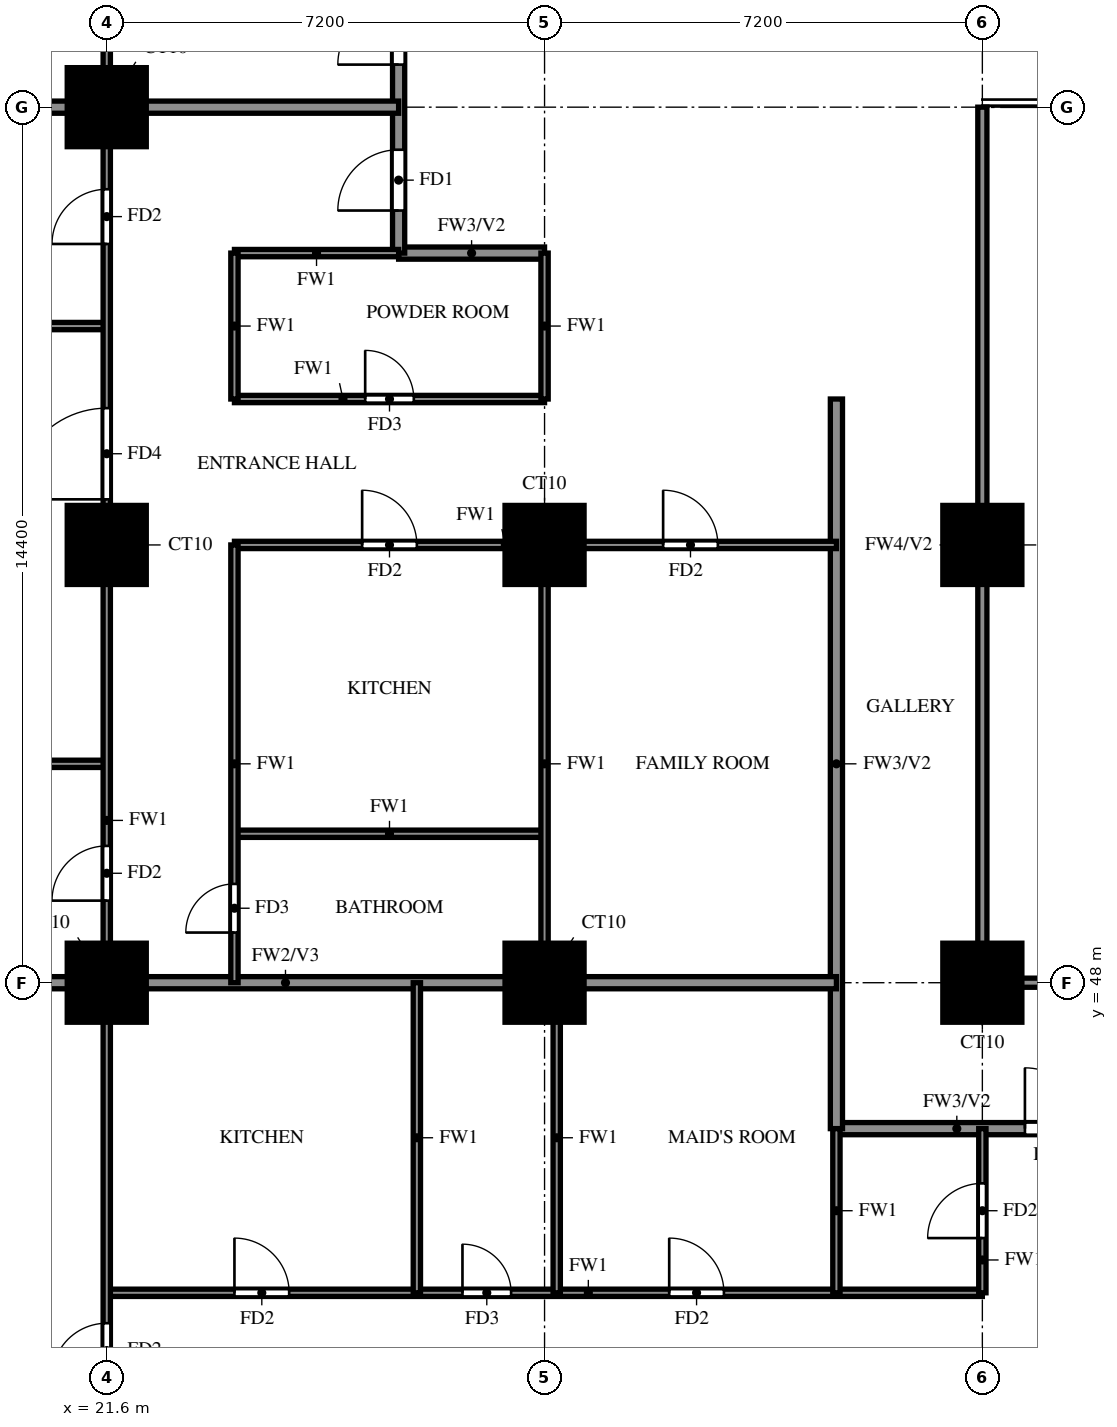
"""IFC4 building model, lengths in metres.
Left out: names, types, materials, properties, quantities, classifications, styles, units other than length and angle.
Written with IfcOpenShell. Run it as: python <this file> out.ifc"""

import sys

from ifc_helpers import new_model, si_unit, direction, frame, frame_2d, origin, origin_2d, place, context, subcontext, project, spatial, rectangle, extrude, source, transform, mapped, element, fill, save


model = new_model("IFC4")
c1 = context("Model", 3, precision=1e-05, world=origin(), true_north=direction((0.0, 1.0)))
c2 = subcontext(c1, "Body", "Model", "MODEL_VIEW")
j1 = project(units=[si_unit("LENGTHUNIT", "METRE"), si_unit("PLANEANGLEUNIT", "RADIAN")], contexts=[c1])
p1 = place(None, origin())
s1 = spatial("IfcSite", under=j1, at=p1, CompositionType="ELEMENT")
p2 = place(p1, origin())
s2 = spatial("IfcBuilding", under=s1, at=p2, CompositionType="ELEMENT")
p3 = place(p2, frame((0.0, 0.0, 90.0)))
s3 = spatial("IfcBuildingStorey", under=s2, at=p3, CompositionType="ELEMENT", Elevation=90.0)
m1 = source(origin(), c2, "Body", "SweptSolid", [
    extrude(rectangle(XDim=1.3, YDim=1.3, at=origin_2d()), origin(), (0.0, 0.0, 1.0), 3.18),
])
for number, where, z_axis, x_axis in (
    (1, (21.6, 48.0, 0.0), (0.0, 0.0, 1.0), (1.0, 0.0, 0.0)),
    (2, (28.8, 48.0, 0.0), (0.0, 0.0, 1.0), (1.0, 0.0, 0.0)),
    (3, (36.0, 48.0, 0.0), (0.0, 0.0, 1.0), (1.0, 0.0, 0.0)),
    (4, (21.6, 55.2, 0.0), (0.0, 0.0, 1.0), (1.0, 0.0, 0.0)),
    (5, (28.8, 55.2, 0.0), (0.0, 0.0, 1.0), (1.0, 0.0, 0.0)),
    (6, (36.0, 55.2, 0.0), (0.0, 0.0, 1.0), (1.0, 0.0, 0.0)),
    (7, (21.6, 62.4, 0.0), (0.0, 0.0, 1.0), (1.0, 0.0, 0.0)),
):
    element("IfcColumn", number, at=place(p3, frame(where, z_axis=z_axis, x_axis=x_axis)), inside=s3, PredefinedType="COLUMN", context=c2, shape_type="MappedRepresentation", body=[
        mapped(m1, transform((0.0, 0.0, 0.0))),
    ])
p4 = place(p3, frame((33.6, 45.6, 0.0), z_axis=(0.0, 0.0, 1.0), x_axis=(1.0, 0.0, 0.0)))
e8 = element("IfcWall", 8, at=p4, inside=s3, PredefinedType="SOLIDWALL", context=c2, shape_type="SweptSolid", body=[
    extrude(rectangle(XDim=7.2, YDim=0.2, at=frame_2d((3.6, 0.0))), origin(), (0.0, 0.0, 1.0), 3.18),
])
p5 = place(p4, frame((3.1, 0.0, 0.0)))
e9 = element("IfcOpeningElement", 9, at=p5, cuts=e8, PredefinedType="OPENING", context=c2, shape_type="SweptSolid", body=[
    extrude(rectangle(XDim=1.0, YDim=2.1, at=frame_2d((0.5, 1.05))), frame((0.0, 0.11, 0.0), z_axis=(0.0, -1.0, 0.0), x_axis=(1.0, 0.0, 0.0)), (0.0, 0.0, 1.0), 0.22),
])
p6 = place(p3, frame((26.4, 60.0, 0.0), z_axis=(0.0, 0.0, 1.0), x_axis=(1.0, 0.0, 0.0)))
e10 = element("IfcWall", 10, at=p6, inside=s3, PredefinedType="SOLIDWALL", context=c2, shape_type="SweptSolid", body=[
    extrude(rectangle(XDim=2.4, YDim=0.2, at=frame_2d((1.2, 0.0))), origin(), (0.0, 0.0, 1.0), 3.18),
])
p7 = place(p3, frame((26.4, 60.0, 0.0), z_axis=(0.0, 0.0, 1.0), x_axis=(0.0, 1.0, 0.0)))
e11 = element("IfcWall", 11, at=p7, inside=s3, PredefinedType="SOLIDWALL", context=c2, shape_type="SweptSolid", body=[
    extrude(rectangle(XDim=9.45, YDim=0.2, at=frame_2d((4.725, 0.0))), origin(), (0.0, 0.0, 1.0), 3.18),
])
p8 = place(p7, frame((0.7, 0.0, 0.0)))
e12 = element("IfcOpeningElement", 12, at=p8, cuts=e11, PredefinedType="OPENING", context=c2, shape_type="SweptSolid", body=[
    extrude(rectangle(XDim=1.0, YDim=2.1, at=frame_2d((0.5, 1.05))), frame((0.0, 0.11, 0.0), z_axis=(0.0, -1.0, 0.0), x_axis=(1.0, 0.0, 0.0)), (0.0, 0.0, 1.0), 0.22),
])
p9 = place(p7, frame((3.1, 0.0, 0.0)))
e13 = element("IfcOpeningElement", 13, at=p9, cuts=e11, PredefinedType="OPENING", context=c2, shape_type="SweptSolid", body=[
    extrude(rectangle(XDim=1.0, YDim=2.1, at=frame_2d((0.5, 1.05))), frame((0.0, 0.11, 0.0), z_axis=(0.0, -1.0, 0.0), x_axis=(1.0, 0.0, 0.0)), (0.0, 0.0, 1.0), 0.22),
])
p10 = place(p3, frame((33.6, 45.6, 0.0), z_axis=(0.0, 0.0, 1.0), x_axis=(0.0, 1.0, 0.0)))
e14 = element("IfcWall", 14, at=p10, inside=s3, PredefinedType="SOLIDWALL", context=c2, shape_type="SweptSolid", body=[
    extrude(rectangle(XDim=12.0, YDim=0.2, at=frame_2d((6.0, 0.0))), origin(), (0.0, 0.0, 1.0), 3.18),
])
p11 = place(p3, frame((14.525, 48.0, 0.0), z_axis=(0.0, 0.0, 1.0), x_axis=(1.0, 0.0, 0.0)))
e15 = element("IfcWall", 15, at=p11, inside=s3, PredefinedType="SOLIDWALL", context=c2, shape_type="SweptSolid", body=[
    extrude(rectangle(XDim=19.075, YDim=0.2, at=frame_2d((9.538, 0.0))), origin(), (0.0, 0.0, 1.0), 3.18),
])
p12 = place(p3, frame((14.525, 62.4, 0.0), z_axis=(0.0, 0.0, 1.0), x_axis=(1.0, 0.0, 0.0)))
e16 = element("IfcWall", 16, at=p12, inside=s3, PredefinedType="SOLIDWALL", context=c2, shape_type="SweptSolid", body=[
    extrude(rectangle(XDim=11.875, YDim=0.2, at=frame_2d((5.938, 0.0))), origin(), (0.0, 0.0, 1.0), 3.18),
])
p13 = place(p3, frame((21.6, 42.9, 0.0), z_axis=(0.0, 0.0, 1.0), x_axis=(1.0, 0.0, 0.0)))
e17 = element("IfcWall", 17, at=p13, inside=s3, PredefinedType="PARTITIONING", context=c2, shape_type="SweptSolid", body=[
    extrude(rectangle(XDim=14.4, YDim=0.12, at=frame_2d((7.2, 0.0))), origin(), (0.0, 0.0, 1.0), 3.18),
])
p14 = place(p13, frame((2.1, 0.0, 0.0)))
e18 = element("IfcOpeningElement", 18, at=p14, cuts=e17, PredefinedType="OPENING", context=c2, shape_type="SweptSolid", body=[
    extrude(rectangle(XDim=0.9, YDim=2.1, at=frame_2d((0.45, 1.05))), frame((0.0, 0.07, 0.0), z_axis=(0.0, -1.0, 0.0), x_axis=(1.0, 0.0, 0.0)), (0.0, 0.0, 1.0), 0.14),
])
p15 = place(p13, frame((5.85, 0.0, 0.0)))
e19 = element("IfcOpeningElement", 19, at=p15, cuts=e17, PredefinedType="OPENING", context=c2, shape_type="SweptSolid", body=[
    extrude(rectangle(XDim=0.8, YDim=2.1, at=frame_2d((0.4, 1.05))), frame((0.0, 0.07, 0.0), z_axis=(0.0, -1.0, 0.0), x_axis=(1.0, 0.0, 0.0)), (0.0, 0.0, 1.0), 0.14),
])
p16 = place(p13, frame((9.25, 0.0, 0.0)))
e20 = element("IfcOpeningElement", 20, at=p16, cuts=e17, PredefinedType="OPENING", context=c2, shape_type="SweptSolid", body=[
    extrude(rectangle(XDim=0.9, YDim=2.1, at=frame_2d((0.45, 1.05))), frame((0.0, 0.07, 0.0), z_axis=(0.0, -1.0, 0.0), x_axis=(1.0, 0.0, 0.0)), (0.0, 0.0, 1.0), 0.14),
])
p17 = place(p3, frame((23.7, 50.45, 0.0), z_axis=(0.0, 0.0, 1.0), x_axis=(1.0, 0.0, 0.0)))
e21 = element("IfcWall", 21, at=p17, inside=s3, PredefinedType="PARTITIONING", context=c2, shape_type="SweptSolid", body=[
    extrude(rectangle(XDim=5.1, YDim=0.12, at=frame_2d((2.55, 0.0))), origin(), (0.0, 0.0, 1.0), 3.18),
])
p18 = place(p3, frame((14.525, 51.6, 0.0), z_axis=(0.0, 0.0, 1.0), x_axis=(1.0, 0.0, 0.0)))
e22 = element("IfcWall", 22, at=p18, inside=s3, PredefinedType="PARTITIONING", context=c2, shape_type="SweptSolid", body=[
    extrude(rectangle(XDim=7.075, YDim=0.12, at=frame_2d((3.538, 0.0))), origin(), (0.0, 0.0, 1.0), 2.28),
])
p19 = place(p3, frame((23.7, 55.2, 0.0), z_axis=(0.0, 0.0, 1.0), x_axis=(1.0, 0.0, 0.0)))
e23 = element("IfcWall", 23, at=p19, inside=s3, PredefinedType="PARTITIONING", context=c2, shape_type="SweptSolid", body=[
    extrude(rectangle(XDim=9.9, YDim=0.12, at=frame_2d((4.95, 0.0))), origin(), (0.0, 0.0, 1.0), 3.18),
])
p20 = place(p19, frame((2.1, 0.0, 0.0)))
e24 = element("IfcOpeningElement", 24, at=p20, cuts=e23, PredefinedType="OPENING", context=c2, shape_type="SweptSolid", body=[
    extrude(rectangle(XDim=0.9, YDim=2.1, at=frame_2d((0.45, 1.05))), frame((0.0, 0.07, 0.0), z_axis=(0.0, -1.0, 0.0), x_axis=(1.0, 0.0, 0.0)), (0.0, 0.0, 1.0), 0.14),
])
p21 = place(p19, frame((7.05, 0.0, 0.0)))
e25 = element("IfcOpeningElement", 25, at=p21, cuts=e23, PredefinedType="OPENING", context=c2, shape_type="SweptSolid", body=[
    extrude(rectangle(XDim=0.9, YDim=2.1, at=frame_2d((0.45, 1.05))), frame((0.0, 0.07, 0.0), z_axis=(0.0, -1.0, 0.0), x_axis=(1.0, 0.0, 0.0)), (0.0, 0.0, 1.0), 0.14),
])
p22 = place(p3, frame((23.7, 57.6, 0.0), z_axis=(0.0, 0.0, 1.0), x_axis=(1.0, 0.0, 0.0)))
e26 = element("IfcWall", 26, at=p22, inside=s3, PredefinedType="PARTITIONING", context=c2, shape_type="SweptSolid", body=[
    extrude(rectangle(XDim=5.1, YDim=0.12, at=frame_2d((2.55, 0.0))), origin(), (0.0, 0.0, 1.0), 3.18),
])
p23 = place(p22, frame((2.15, 0.0, 0.0)))
e27 = element("IfcOpeningElement", 27, at=p23, cuts=e26, PredefinedType="OPENING", context=c2, shape_type="SweptSolid", body=[
    extrude(rectangle(XDim=0.8, YDim=2.1, at=frame_2d((0.4, 1.05))), frame((0.0, 0.07, 0.0), z_axis=(0.0, -1.0, 0.0), x_axis=(1.0, 0.0, 0.0)), (0.0, 0.0, 1.0), 0.14),
])
p24 = place(p3, frame((14.525, 58.8, 0.0), z_axis=(0.0, 0.0, 1.0), x_axis=(1.0, 0.0, 0.0)))
e28 = element("IfcWall", 28, at=p24, inside=s3, PredefinedType="PARTITIONING", context=c2, shape_type="SweptSolid", body=[
    extrude(rectangle(XDim=7.075, YDim=0.12, at=frame_2d((3.538, 0.0))), origin(), (0.0, 0.0, 1.0), 2.28),
])
p25 = place(p3, frame((23.7, 60.0, 0.0), z_axis=(0.0, 0.0, 1.0), x_axis=(1.0, 0.0, 0.0)))
e29 = element("IfcWall", 29, at=p25, inside=s3, PredefinedType="PARTITIONING", context=c2, shape_type="SweptSolid", body=[
    extrude(rectangle(XDim=2.7, YDim=0.12, at=frame_2d((1.35, 0.0))), origin(), (0.0, 0.0, 1.0), 3.18),
])
p26 = place(p3, frame((21.6, 33.725, 0.0), z_axis=(0.0, 0.0, 1.0), x_axis=(0.0, 1.0, 0.0)))
e30 = element("IfcWall", 30, at=p26, inside=s3, PredefinedType="PARTITIONING", context=c2, shape_type="SweptSolid", body=[
    extrude(rectangle(XDim=32.275, YDim=0.12, at=frame_2d((16.137, 0.0))), origin(), (0.0, 0.0, 1.0), 3.18),
])
p27 = place(p26, frame((7.775, 0.0, 0.0)))
e31 = element("IfcOpeningElement", 31, at=p27, cuts=e30, PredefinedType="OPENING", context=c2, shape_type="SweptSolid", body=[
    extrude(rectangle(XDim=0.9, YDim=2.1, at=frame_2d((0.45, 1.05))), frame((0.0, 0.07, 0.0), z_axis=(0.0, -1.0, 0.0), x_axis=(1.0, 0.0, 0.0)), (0.0, 0.0, 1.0), 0.14),
])
p28 = place(p26, frame((15.625, 0.0, 0.0)))
e32 = element("IfcOpeningElement", 32, at=p28, cuts=e30, PredefinedType="OPENING", context=c2, shape_type="SweptSolid", body=[
    extrude(rectangle(XDim=0.9, YDim=2.1, at=frame_2d((0.45, 1.05))), frame((0.0, 0.07, 0.0), z_axis=(0.0, -1.0, 0.0), x_axis=(1.0, 0.0, 0.0)), (0.0, 0.0, 1.0), 0.14),
])
p29 = place(p26, frame((22.225, 0.0, 0.0)))
e33 = element("IfcOpeningElement", 33, at=p29, cuts=e30, PredefinedType="OPENING", context=c2, shape_type="SweptSolid", body=[
    extrude(rectangle(XDim=1.5, YDim=2.1, at=frame_2d((0.75, 1.05))), frame((0.0, 0.07, 0.0), z_axis=(0.0, -1.0, 0.0), x_axis=(1.0, 0.0, 0.0)), (0.0, 0.0, 1.0), 0.14),
])
p30 = place(p26, frame((26.425, 0.0, 0.0)))
e34 = element("IfcOpeningElement", 34, at=p30, cuts=e30, PredefinedType="OPENING", context=c2, shape_type="SweptSolid", body=[
    extrude(rectangle(XDim=0.9, YDim=2.1, at=frame_2d((0.45, 1.05))), frame((0.0, 0.07, 0.0), z_axis=(0.0, -1.0, 0.0), x_axis=(1.0, 0.0, 0.0)), (0.0, 0.0, 1.0), 0.14),
])
p31 = place(p26, frame((30.025, 0.0, 0.0)))
e35 = element("IfcOpeningElement", 35, at=p31, cuts=e30, PredefinedType="OPENING", context=c2, shape_type="SweptSolid", body=[
    extrude(rectangle(XDim=0.9, YDim=2.1, at=frame_2d((0.45, 1.05))), frame((0.0, 0.07, 0.0), z_axis=(0.0, -1.0, 0.0), x_axis=(1.0, 0.0, 0.0)), (0.0, 0.0, 1.0), 0.14),
])
p32 = place(p3, frame((23.7, 48.0, 0.0), z_axis=(0.0, 0.0, 1.0), x_axis=(0.0, 1.0, 0.0)))
e36 = element("IfcWall", 36, at=p32, inside=s3, PredefinedType="PARTITIONING", context=c2, shape_type="SweptSolid", body=[
    extrude(rectangle(XDim=7.2, YDim=0.12, at=frame_2d((3.6, 0.0))), origin(), (0.0, 0.0, 1.0), 3.18),
])
p33 = place(p32, frame((0.825, 0.0, 0.0)))
e37 = element("IfcOpeningElement", 37, at=p33, cuts=e36, PredefinedType="OPENING", context=c2, shape_type="SweptSolid", body=[
    extrude(rectangle(XDim=0.8, YDim=2.1, at=frame_2d((0.4, 1.05))), frame((0.0, 0.07, 0.0), z_axis=(0.0, -1.0, 0.0), x_axis=(1.0, 0.0, 0.0)), (0.0, 0.0, 1.0), 0.14),
])
p34 = place(p3, frame((23.7, 57.6, 0.0), z_axis=(0.0, 0.0, 1.0), x_axis=(0.0, 1.0, 0.0)))
e38 = element("IfcWall", 38, at=p34, inside=s3, PredefinedType="PARTITIONING", context=c2, shape_type="SweptSolid", body=[
    extrude(rectangle(XDim=2.4, YDim=0.12, at=frame_2d((1.2, 0.0))), origin(), (0.0, 0.0, 1.0), 3.18),
])
p35 = place(p3, frame((26.7, 42.9, 0.0), z_axis=(0.0, 0.0, 1.0), x_axis=(0.0, 1.0, 0.0)))
e39 = element("IfcWall", 39, at=p35, inside=s3, PredefinedType="PARTITIONING", context=c2, shape_type="SweptSolid", body=[
    extrude(rectangle(XDim=5.1, YDim=0.12, at=frame_2d((2.55, 0.0))), origin(), (0.0, 0.0, 1.0), 3.18),
])
p36 = place(p3, frame((28.8, 48.0, 0.0), z_axis=(0.0, 0.0, 1.0), x_axis=(0.0, 1.0, 0.0)))
e40 = element("IfcWall", 40, at=p36, inside=s3, PredefinedType="PARTITIONING", context=c2, shape_type="SweptSolid", body=[
    extrude(rectangle(XDim=7.2, YDim=0.12, at=frame_2d((3.6, 0.0))), origin(), (0.0, 0.0, 1.0), 3.18),
])
p37 = place(p3, frame((28.8, 57.6, 0.0), z_axis=(0.0, 0.0, 1.0), x_axis=(0.0, 1.0, 0.0)))
e41 = element("IfcWall", 41, at=p37, inside=s3, PredefinedType="PARTITIONING", context=c2, shape_type="SweptSolid", body=[
    extrude(rectangle(XDim=2.4, YDim=0.12, at=frame_2d((1.2, 0.0))), origin(), (0.0, 0.0, 1.0), 3.18),
])
p38 = place(p3, frame((29.0, 42.9, 0.0), z_axis=(0.0, 0.0, 1.0), x_axis=(0.0, 1.0, 0.0)))
e42 = element("IfcWall", 42, at=p38, inside=s3, PredefinedType="PARTITIONING", context=c2, shape_type="SweptSolid", body=[
    extrude(rectangle(XDim=5.1, YDim=0.12, at=frame_2d((2.55, 0.0))), origin(), (0.0, 0.0, 1.0), 3.18),
])
p39 = place(p3, frame((33.6, 42.9, 0.0), z_axis=(0.0, 0.0, 1.0), x_axis=(0.0, 1.0, 0.0)))
e43 = element("IfcWall", 43, at=p39, inside=s3, PredefinedType="PARTITIONING", context=c2, shape_type="SweptSolid", body=[
    extrude(rectangle(XDim=2.7, YDim=0.12, at=frame_2d((1.35, 0.0))), origin(), (0.0, 0.0, 1.0), 3.18),
])
p40 = place(p3, frame((36.0, 42.9, 0.0), z_axis=(0.0, 0.0, 1.0), x_axis=(0.0, 1.0, 0.0)))
e44 = element("IfcWall", 44, at=p40, inside=s3, PredefinedType="PARTITIONING", context=c2, shape_type="SweptSolid", body=[
    extrude(rectangle(XDim=2.7, YDim=0.12, at=frame_2d((1.35, 0.0))), origin(), (0.0, 0.0, 1.0), 3.18),
])
p41 = place(p40, frame((0.9, 0.0, 0.0)))
e45 = element("IfcOpeningElement", 45, at=p41, cuts=e44, PredefinedType="OPENING", context=c2, shape_type="SweptSolid", body=[
    extrude(rectangle(XDim=0.9, YDim=2.1, at=frame_2d((0.45, 1.05))), frame((0.0, 0.07, 0.0), z_axis=(0.0, -1.0, 0.0), x_axis=(1.0, 0.0, 0.0)), (0.0, 0.0, 1.0), 0.14),
])
p42 = place(p3, frame((36.0, 48.0, 0.0), z_axis=(0.0, 0.0, 1.0), x_axis=(1.0, 0.0, 0.0)))
e46 = element("IfcWall", 46, at=p42, inside=s3, PredefinedType="SOLIDWALL", context=c2, shape_type="SweptSolid", body=[
    extrude(rectangle(XDim=7.2, YDim=0.15, at=frame_2d((3.6, 0.0))), origin(), (0.0, 0.0, 1.0), 2.28),
])
p43 = place(p3, frame((36.0, 48.0, 0.0), z_axis=(0.0, 0.0, 1.0), x_axis=(0.0, 1.0, 0.0)))
e47 = element("IfcWall", 47, at=p43, inside=s3, PredefinedType="SOLIDWALL", context=c2, shape_type="SweptSolid", body=[
    extrude(rectangle(XDim=14.4, YDim=0.15, at=frame_2d((7.2, 0.0))), origin(), (0.0, 0.0, 1.0), 2.28),
])
p44 = place(p5, origin())
e48 = element("IfcDoor", 48, at=p44, inside=s3, OperationType="SINGLE_SWING_LEFT", PredefinedType="DOOR", context=c2, shape_type="SweptSolid", body=[
    extrude(rectangle(XDim=1.0, YDim=2.1, at=frame_2d((0.5, 1.05))), frame((0.0, 0.025, 0.0), z_axis=(0.0, -1.0, 0.0), x_axis=(1.0, 0.0, 0.0)), (0.0, 0.0, 1.0), 0.05),
])
fill(e9, e48)
p45 = place(p27, origin())
e49 = element("IfcDoor", 49, at=p45, inside=s3, OperationType="SINGLE_SWING_LEFT", PredefinedType="DOOR", context=c2, shape_type="SweptSolid", body=[
    extrude(rectangle(XDim=0.9, YDim=2.1, at=frame_2d((0.45, 1.05))), frame((0.0, 0.025, 0.0), z_axis=(0.0, -1.0, 0.0), x_axis=(1.0, 0.0, 0.0)), (0.0, 0.0, 1.0), 0.05),
])
fill(e31, e49)
p46 = place(p14, origin())
e50 = element("IfcDoor", 50, at=p46, inside=s3, OperationType="SINGLE_SWING_RIGHT", PredefinedType="DOOR", context=c2, shape_type="SweptSolid", body=[
    extrude(rectangle(XDim=0.9, YDim=2.1, at=frame_2d((0.45, 1.05))), frame((0.0, 0.025, 0.0), z_axis=(0.0, -1.0, 0.0), x_axis=(1.0, 0.0, 0.0)), (0.0, 0.0, 1.0), 0.05),
])
fill(e18, e50)
p47 = place(p15, origin())
e51 = element("IfcDoor", 51, at=p47, inside=s3, OperationType="SINGLE_SWING_LEFT", PredefinedType="DOOR", context=c2, shape_type="SweptSolid", body=[
    extrude(rectangle(XDim=0.8, YDim=2.1, at=frame_2d((0.4, 1.05))), frame((0.0, 0.025, 0.0), z_axis=(0.0, -1.0, 0.0), x_axis=(1.0, 0.0, 0.0)), (0.0, 0.0, 1.0), 0.05),
])
fill(e19, e51)
p48 = place(p16, origin())
e52 = element("IfcDoor", 52, at=p48, inside=s3, OperationType="SINGLE_SWING_LEFT", PredefinedType="DOOR", context=c2, shape_type="SweptSolid", body=[
    extrude(rectangle(XDim=0.9, YDim=2.1, at=frame_2d((0.45, 1.05))), frame((0.0, 0.025, 0.0), z_axis=(0.0, -1.0, 0.0), x_axis=(1.0, 0.0, 0.0)), (0.0, 0.0, 1.0), 0.05),
])
fill(e20, e52)
p49 = place(p41, origin())
e53 = element("IfcDoor", 53, at=p49, inside=s3, OperationType="SINGLE_SWING_RIGHT", PredefinedType="DOOR", context=c2, shape_type="SweptSolid", body=[
    extrude(rectangle(XDim=0.9, YDim=2.1, at=frame_2d((0.45, 1.05))), frame((0.0, 0.025, 0.0), z_axis=(0.0, -1.0, 0.0), x_axis=(1.0, 0.0, 0.0)), (0.0, 0.0, 1.0), 0.05),
])
fill(e45, e53)
p50 = place(p8, origin())
e54 = element("IfcDoor", 54, at=p50, inside=s3, OperationType="SINGLE_SWING_LEFT", PredefinedType="DOOR", context=c2, shape_type="SweptSolid", body=[
    extrude(rectangle(XDim=1.0, YDim=2.1, at=frame_2d((0.5, 1.05))), frame((0.0, 0.025, 0.0), z_axis=(0.0, -1.0, 0.0), x_axis=(1.0, 0.0, 0.0)), (0.0, 0.0, 1.0), 0.05),
])
fill(e12, e54)
p51 = place(p28, origin())
e55 = element("IfcDoor", 55, at=p51, inside=s3, OperationType="SINGLE_SWING_RIGHT", PredefinedType="DOOR", context=c2, shape_type="SweptSolid", body=[
    extrude(rectangle(XDim=0.9, YDim=2.1, at=frame_2d((0.45, 1.05))), frame((0.0, 0.025, 0.0), z_axis=(0.0, -1.0, 0.0), x_axis=(1.0, 0.0, 0.0)), (0.0, 0.0, 1.0), 0.05),
])
fill(e32, e55)
p52 = place(p29, origin())
e56 = element("IfcDoor", 56, at=p52, inside=s3, OperationType="SINGLE_SWING_RIGHT", PredefinedType="DOOR", context=c2, shape_type="SweptSolid", body=[
    extrude(rectangle(XDim=1.5, YDim=2.1, at=frame_2d((0.75, 1.05))), frame((0.0, 0.025, 0.0), z_axis=(0.0, -1.0, 0.0), x_axis=(1.0, 0.0, 0.0)), (0.0, 0.0, 1.0), 0.05),
])
fill(e33, e56)
p53 = place(p30, origin())
e57 = element("IfcDoor", 57, at=p53, inside=s3, OperationType="SINGLE_SWING_LEFT", PredefinedType="DOOR", context=c2, shape_type="SweptSolid", body=[
    extrude(rectangle(XDim=0.9, YDim=2.1, at=frame_2d((0.45, 1.05))), frame((0.0, 0.025, 0.0), z_axis=(0.0, -1.0, 0.0), x_axis=(1.0, 0.0, 0.0)), (0.0, 0.0, 1.0), 0.05),
])
fill(e34, e57)
p54 = place(p33, origin())
e58 = element("IfcDoor", 58, at=p54, inside=s3, OperationType="SINGLE_SWING_RIGHT", PredefinedType="DOOR", context=c2, shape_type="SweptSolid", body=[
    extrude(rectangle(XDim=0.8, YDim=2.1, at=frame_2d((0.4, 1.05))), frame((0.0, 0.025, 0.0), z_axis=(0.0, -1.0, 0.0), x_axis=(1.0, 0.0, 0.0)), (0.0, 0.0, 1.0), 0.05),
])
fill(e37, e58)
p55 = place(p20, origin())
e59 = element("IfcDoor", 59, at=p55, inside=s3, OperationType="SINGLE_SWING_LEFT", PredefinedType="DOOR", context=c2, shape_type="SweptSolid", body=[
    extrude(rectangle(XDim=0.9, YDim=2.1, at=frame_2d((0.45, 1.05))), frame((0.0, 0.025, 0.0), z_axis=(0.0, -1.0, 0.0), x_axis=(1.0, 0.0, 0.0)), (0.0, 0.0, 1.0), 0.05),
])
fill(e24, e59)
p56 = place(p23, origin())
e60 = element("IfcDoor", 60, at=p56, inside=s3, OperationType="SINGLE_SWING_LEFT", PredefinedType="DOOR", context=c2, shape_type="SweptSolid", body=[
    extrude(rectangle(XDim=0.8, YDim=2.1, at=frame_2d((0.4, 1.05))), frame((0.0, 0.025, 0.0), z_axis=(0.0, -1.0, 0.0), x_axis=(1.0, 0.0, 0.0)), (0.0, 0.0, 1.0), 0.05),
])
fill(e27, e60)
p57 = place(p21, origin())
e61 = element("IfcDoor", 61, at=p57, inside=s3, OperationType="SINGLE_SWING_RIGHT", PredefinedType="DOOR", context=c2, shape_type="SweptSolid", body=[
    extrude(rectangle(XDim=0.9, YDim=2.1, at=frame_2d((0.45, 1.05))), frame((0.0, 0.025, 0.0), z_axis=(0.0, -1.0, 0.0), x_axis=(1.0, 0.0, 0.0)), (0.0, 0.0, 1.0), 0.05),
])
fill(e25, e61)
p58 = place(p9, origin())
e62 = element("IfcDoor", 62, at=p58, inside=s3, OperationType="SINGLE_SWING_LEFT", PredefinedType="DOOR", context=c2, shape_type="SweptSolid", body=[
    extrude(rectangle(XDim=1.0, YDim=2.1, at=frame_2d((0.5, 1.05))), frame((0.0, 0.025, 0.0), z_axis=(0.0, -1.0, 0.0), x_axis=(1.0, 0.0, 0.0)), (0.0, 0.0, 1.0), 0.05),
])
fill(e13, e62)
save(model, sys.argv[1])
